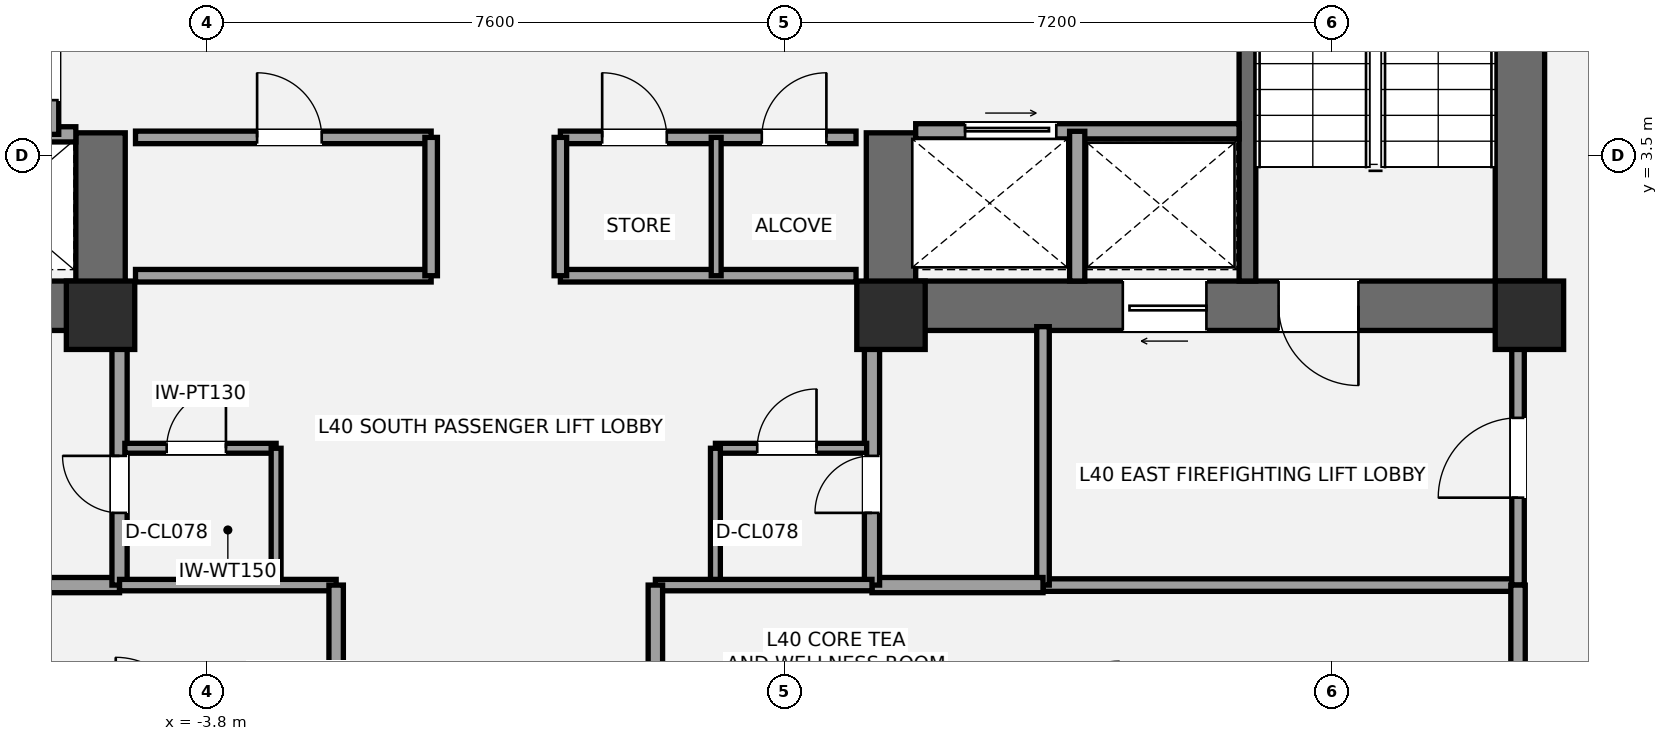
"""IFC4 building model, lengths in metres.
Left out: names, types, materials, properties, quantities, classifications, styles, units other than length and angle.
Written with IfcOpenShell. Run it as: python <this file> out.ifc"""

import sys

from ifc_helpers import new_model, si_unit, direction, frame, frame_2d, origin, origin_2d, place, context, subcontext, project, spatial, rectangle, extrude, element, fill, save


model = new_model("IFC4")
c1 = context("Model", 3, precision=1e-05, world=origin(), true_north=direction((0.0, 1.0)))
c2 = subcontext(c1, "Body", "Model", "MODEL_VIEW")
j1 = project(units=[si_unit("LENGTHUNIT", "METRE"), si_unit("PLANEANGLEUNIT", "RADIAN")], contexts=[c1])
p1 = place(None, origin())
s1 = spatial("IfcSite", under=j1, at=p1, CompositionType="ELEMENT")
p2 = place(p1, origin())
s2 = spatial("IfcBuilding", under=s1, at=p2, CompositionType="ELEMENT")
p3 = place(p2, frame((0.0, 0.0, 150.2)))
s3 = spatial("IfcBuildingStorey", under=s2, at=p3, CompositionType="ELEMENT", Elevation=150.2)
p4 = place(p3, frame((-4.875, 1.525, 0.0), z_axis=(0.0, 0.0, 1.0), x_axis=(-1.0, 0.0, 0.0)))
e1 = element("IfcWall", 1, at=p4, inside=s3, PredefinedType="SHEAR", context=c2, shape_type="SweptSolid", body=[
    extrude(rectangle(XDim=8.925, YDim=0.65, at=frame_2d((4.462, 0.0))), origin(), (0.0, 0.0, 1.0), 3.2),
])
p5 = place(p4, frame((5.425, 0.0, 0.0)))
e2 = element("IfcOpeningElement", 2, at=p5, cuts=e1, PredefinedType="OPENING", context=c2, shape_type="SweptSolid", body=[
    extrude(rectangle(XDim=1.05, YDim=2.15, at=frame_2d((0.525, 1.075))), frame((0.0, 0.335, 0.0), z_axis=(0.0, -1.0, 0.0), x_axis=(1.0, 0.0, 0.0)), (0.0, 0.0, 1.0), 0.67),
])
p6 = place(p4, frame((3.755, 0.0, 0.0)))
e3 = element("IfcOpeningElement", 3, at=p6, cuts=e1, PredefinedType="OPENING", context=c2, shape_type="SweptSolid", body=[
    extrude(rectangle(XDim=1.1, YDim=2.2, at=frame_2d((0.55, 1.1))), frame((0.0, 0.335, 0.0), z_axis=(0.0, -1.0, 0.0), x_axis=(1.0, 0.0, 0.0)), (0.0, 0.0, 1.0), 0.67),
])
p7 = place(p3, frame((-5.2, 1.2, 0.0), z_axis=(0.0, 0.0, 1.0), x_axis=(0.0, 1.0, 0.0)))
e4 = element("IfcWall", 4, at=p7, inside=s3, PredefinedType="SHEAR", context=c2, shape_type="SweptSolid", body=[
    extrude(rectangle(XDim=2.6, YDim=0.65, at=frame_2d((1.3, 0.0))), origin(), (0.0, 0.0, 1.0), 3.2),
])
p8 = place(p3, frame((13.475, 1.2, 0.0), z_axis=(0.0, 0.0, 1.0), x_axis=(0.0, 1.0, 0.0)))
e5 = element("IfcWall", 5, at=p8, inside=s3, PredefinedType="SHEAR", context=c2, shape_type="SweptSolid", body=[
    extrude(rectangle(XDim=8.45, YDim=0.65, at=frame_2d((4.225, 0.0))), origin(), (0.0, 0.0, 1.0), 3.2),
])
p9 = place(p3, frame((13.8, 1.525, 0.0), z_axis=(0.0, 0.0, 1.0), x_axis=(-1.0, 0.0, 0.0)))
e6 = element("IfcWall", 6, at=p9, inside=s3, PredefinedType="SHEAR", context=c2, shape_type="SweptSolid", body=[
    extrude(rectangle(XDim=8.925, YDim=0.65, at=frame_2d((4.462, 0.0))), origin(), (0.0, 0.0, 1.0), 3.2),
])
p10 = place(p9, frame((2.45, 0.0, 0.0)))
e7 = element("IfcOpeningElement", 7, at=p10, cuts=e6, PredefinedType="OPENING", context=c2, shape_type="SweptSolid", body=[
    extrude(rectangle(XDim=1.05, YDim=2.15, at=frame_2d((0.525, 1.075))), frame((0.0, 0.335, 0.0), z_axis=(0.0, -1.0, 0.0), x_axis=(1.0, 0.0, 0.0)), (0.0, 0.0, 1.0), 0.67),
])
p11 = place(p9, frame((4.45, 0.0, 0.0)))
e8 = element("IfcOpeningElement", 8, at=p11, cuts=e6, PredefinedType="OPENING", context=c2, shape_type="SweptSolid", body=[
    extrude(rectangle(XDim=1.1, YDim=2.2, at=frame_2d((0.55, 1.1))), frame((0.0, 0.335, 0.0), z_axis=(0.0, -1.0, 0.0), x_axis=(1.0, 0.0, 0.0)), (0.0, 0.0, 1.0), 0.67),
])
p12 = place(p3, frame((5.2, 1.2, 0.0), z_axis=(0.0, 0.0, 1.0), x_axis=(0.0, 1.0, 0.0)))
e9 = element("IfcWall", 9, at=p12, inside=s3, PredefinedType="SHEAR", context=c2, shape_type="SweptSolid", body=[
    extrude(rectangle(XDim=2.6, YDim=0.65, at=frame_2d((1.3, 0.0))), origin(), (0.0, 0.0, 1.0), 3.2),
])
p13 = place(p3, frame((9.89, 1.85, 0.0), z_axis=(0.0, 0.0, 1.0), x_axis=(0.0, 1.0, 0.0)))
e10 = element("IfcWall", 10, at=p13, inside=s3, PredefinedType="SHEAR", context=c2, shape_type="SweptSolid", body=[
    extrude(rectangle(XDim=7.15, YDim=0.22, at=frame_2d((3.575, 0.0))), origin(), (0.0, 0.0, 1.0), 3.2),
])
for number, where, z_axis, x_axis in (
    (11, (-5.2, 1.4, 0.0), (0.0, 0.0, 1.0), (1.0, 0.0, 0.0)),
    (12, (5.2, 1.4, 0.0), (0.0, 0.0, 1.0), (1.0, 0.0, 0.0)),
    (13, (13.6, 1.4, 0.0), (0.0, 0.0, 1.0), (1.0, 0.0, 0.0)),
):
    element("IfcColumn", number, at=place(p3, frame(where, z_axis=z_axis, x_axis=x_axis)), inside=s3, PredefinedType="COLUMN", context=c2, shape_type="SweptSolid", body=[
        extrude(rectangle(XDim=0.9, YDim=0.9, at=origin_2d()), origin(), (0.0, 0.0, 1.0), 3.2),
    ])
p14 = place(p3, frame((-7.2, -2.15, 0.0), z_axis=(0.0, 0.0, 1.0), x_axis=(1.0, 0.0, 0.0)))
e14 = element("IfcWall", 14, at=p14, inside=s3, PredefinedType="SOLIDWALL", context=c2, shape_type="SweptSolid", body=[
    extrude(rectangle(XDim=2.25, YDim=0.2, at=frame_2d((1.125, 0.0))), origin(), (0.0, 0.0, 1.0), 3.02),
])
p15 = place(p3, frame((-4.95, -2.15, 0.0), z_axis=(0.0, 0.0, 1.0), x_axis=(0.0, 1.0, 0.0)))
e15 = element("IfcWall", 15, at=p15, inside=s3, PredefinedType="SOLIDWALL", context=c2, shape_type="SweptSolid", body=[
    extrude(rectangle(XDim=3.4, YDim=0.2, at=frame_2d((1.7, 0.0))), origin(), (0.0, 0.0, 1.0), 2.473),
])
p16 = place(p15, frame((0.95, 0.0, 0.0)))
e16 = element("IfcOpeningElement", 16, at=p16, cuts=e15, PredefinedType="OPENING", context=c2, shape_type="SweptSolid", body=[
    extrude(rectangle(XDim=0.75, YDim=2.1, at=frame_2d((0.375, 1.05))), frame((0.0, 0.11, 0.0), z_axis=(0.0, -1.0, 0.0), x_axis=(1.0, 0.0, 0.0)), (0.0, 0.0, 1.0), 0.22),
])
p17 = place(p3, frame((7.2, -2.15, 0.0), z_axis=(0.0, 0.0, 1.0), x_axis=(1.0, 0.0, 0.0)))
e17 = element("IfcWall", 17, at=p17, inside=s3, PredefinedType="PARTITIONING", context=c2, shape_type="SweptSolid", body=[
    extrude(rectangle(XDim=6.25, YDim=0.165, at=frame_2d((3.125, 0.0))), origin(), (0.0, 0.0, 1.0), 3.02),
])
p18 = place(p3, frame((7.2, -2.15, 0.0), z_axis=(0.0, 0.0, 1.0), x_axis=(0.0, 1.0, 0.0)))
e18 = element("IfcWall", 18, at=p18, inside=s3, PredefinedType="PARTITIONING", context=c2, shape_type="SweptSolid", body=[
    extrude(rectangle(XDim=3.4, YDim=0.165, at=frame_2d((1.7, 0.0))), origin(), (0.0, 0.0, 1.0), 3.02),
])
p19 = place(p3, frame((13.45, -2.15, 0.0), z_axis=(0.0, 0.0, 1.0), x_axis=(0.0, 1.0, 0.0)))
e19 = element("IfcWall", 19, at=p19, inside=s3, PredefinedType="PARTITIONING", context=c2, shape_type="SweptSolid", body=[
    extrude(rectangle(XDim=3.4, YDim=0.165, at=frame_2d((1.7, 0.0))), origin(), (0.0, 0.0, 1.0), 2.473),
])
p20 = place(p19, frame((1.15, 0.0, 0.0)))
e20 = element("IfcOpeningElement", 20, at=p20, cuts=e19, PredefinedType="OPENING", context=c2, shape_type="SweptSolid", body=[
    extrude(rectangle(XDim=1.05, YDim=2.15, at=frame_2d((0.525, 1.075))), frame((0.0, 0.093, 0.0), z_axis=(0.0, -1.0, 0.0), x_axis=(1.0, 0.0, 0.0)), (0.0, 0.0, 1.0), 0.185),
])
p21 = place(p3, frame((4.95, -2.15, 0.0), z_axis=(0.0, 0.0, 1.0), x_axis=(1.0, 0.0, 0.0)))
e21 = element("IfcWall", 21, at=p21, inside=s3, PredefinedType="SOLIDWALL", context=c2, shape_type="SweptSolid", body=[
    extrude(rectangle(XDim=2.25, YDim=0.2, at=frame_2d((1.125, 0.0))), origin(), (0.0, 0.0, 1.0), 3.02),
])
p22 = place(p3, frame((4.95, -2.15, 0.0), z_axis=(0.0, 0.0, 1.0), x_axis=(0.0, 1.0, 0.0)))
e22 = element("IfcWall", 22, at=p22, inside=s3, PredefinedType="SOLIDWALL", context=c2, shape_type="SweptSolid", body=[
    extrude(rectangle(XDim=3.4, YDim=0.2, at=frame_2d((1.7, 0.0))), origin(), (0.0, 0.0, 1.0), 2.473),
])
p23 = place(p22, frame((0.95, 0.0, 0.0)))
e23 = element("IfcOpeningElement", 23, at=p23, cuts=e22, PredefinedType="OPENING", context=c2, shape_type="SweptSolid", body=[
    extrude(rectangle(XDim=0.75, YDim=2.1, at=frame_2d((0.375, 1.05))), frame((0.0, 0.11, 0.0), z_axis=(0.0, -1.0, 0.0), x_axis=(1.0, 0.0, 0.0)), (0.0, 0.0, 1.0), 0.22),
])
p24 = place(p3, frame((-4.88, -0.35, 0.0), z_axis=(0.0, 0.0, 1.0), x_axis=(1.0, 0.0, 0.0)))
e24 = element("IfcWall", 24, at=p24, inside=s3, PredefinedType="PARTITIONING", context=c2, shape_type="SweptSolid", body=[
    extrude(rectangle(XDim=1.99, YDim=0.13, at=frame_2d((0.995, 0.0))), origin(), (0.0, 0.0, 1.0), 3.02),
])
p25 = place(p24, frame((0.55, 0.0, 0.0)))
e25 = element("IfcOpeningElement", 25, at=p25, cuts=e24, PredefinedType="OPENING", context=c2, shape_type="SweptSolid", body=[
    extrude(rectangle(XDim=0.78, YDim=2.1, at=frame_2d((0.39, 1.05))), frame((0.0, 0.075, 0.0), z_axis=(0.0, -1.0, 0.0), x_axis=(1.0, 0.0, 0.0)), (0.0, 0.0, 1.0), 0.15),
])
p26 = place(p3, frame((-2.89, -2.15, 0.0), z_axis=(0.0, 0.0, 1.0), x_axis=(0.0, 1.0, 0.0)))
e26 = element("IfcWall", 26, at=p26, inside=s3, PredefinedType="PARTITIONING", context=c2, shape_type="SweptSolid", body=[
    extrude(rectangle(XDim=1.8, YDim=0.13, at=frame_2d((0.9, 0.0))), origin(), (0.0, 0.0, 1.0), 3.02),
])
p27 = place(p3, frame((2.89, -0.35, 0.0), z_axis=(0.0, 0.0, 1.0), x_axis=(1.0, 0.0, 0.0)))
e27 = element("IfcWall", 27, at=p27, inside=s3, PredefinedType="PARTITIONING", context=c2, shape_type="SweptSolid", body=[
    extrude(rectangle(XDim=1.99, YDim=0.13, at=frame_2d((0.995, 0.0))), origin(), (0.0, 0.0, 1.0), 3.02),
])
p28 = place(p27, frame((0.55, 0.0, 0.0)))
e28 = element("IfcOpeningElement", 28, at=p28, cuts=e27, PredefinedType="OPENING", context=c2, shape_type="SweptSolid", body=[
    extrude(rectangle(XDim=0.78, YDim=2.1, at=frame_2d((0.39, 1.05))), frame((0.0, 0.075, 0.0), z_axis=(0.0, -1.0, 0.0), x_axis=(1.0, 0.0, 0.0)), (0.0, 0.0, 1.0), 0.15),
])
p29 = place(p3, frame((2.89, -2.15, 0.0), z_axis=(0.0, 0.0, 1.0), x_axis=(0.0, 1.0, 0.0)))
e29 = element("IfcWall", 29, at=p29, inside=s3, PredefinedType="PARTITIONING", context=c2, shape_type="SweptSolid", body=[
    extrude(rectangle(XDim=1.8, YDim=0.13, at=frame_2d((0.9, 0.0))), origin(), (0.0, 0.0, 1.0), 3.02),
])
p30 = place(p3, frame((-9.78, 3.78, 0.0), z_axis=(0.0, 0.0, 1.0), x_axis=(1.0, 0.0, 0.0)))
e30 = element("IfcWall", 30, at=p30, inside=s3, PredefinedType="SOLIDWALL", context=c2, shape_type="SweptSolid", body=[
    extrude(rectangle(XDim=4.255, YDim=0.2, at=frame_2d((2.127, 0.0))), origin(), (0.0, 0.0, 1.0), 3.02),
])
p31 = place(p3, frame((-5.85, 3.78, 0.0), z_axis=(0.0, 0.0, 1.0), x_axis=(0.0, 1.0, 0.0)))
e31 = element("IfcWall", 31, at=p31, inside=s3, PredefinedType="SOLIDWALL", context=c2, shape_type="SweptSolid", body=[
    extrude(rectangle(XDim=1.69, YDim=0.2, at=frame_2d((0.845, 0.0))), origin(), (0.0, 0.0, 1.0), 3.02),
])
p32 = place(p31, frame((0.45, 0.0, 0.0)))
e32 = element("IfcOpeningElement", 32, at=p32, cuts=e31, PredefinedType="OPENING", context=c2, shape_type="SweptSolid", body=[
    extrude(rectangle(XDim=0.75, YDim=2.1, at=frame_2d((0.375, 1.05))), frame((0.0, 0.11, 0.0), z_axis=(0.0, -1.0, 0.0), x_axis=(1.0, 0.0, 0.0)), (0.0, 0.0, 1.0), 0.22),
])
p33 = place(p3, frame((5.525, 3.82, 0.0), z_axis=(0.0, 0.0, 1.0), x_axis=(1.0, 0.0, 0.0)))
e33 = element("IfcWall", 33, at=p33, inside=s3, PredefinedType="SOLIDWALL", context=c2, shape_type="SweptSolid", body=[
    extrude(rectangle(XDim=4.255, YDim=0.2, at=frame_2d((2.127, 0.0))), origin(), (0.0, 0.0, 1.0), 3.02),
])
p34 = place(p33, frame((0.65, 0.0, 0.0)))
e34 = element("IfcOpeningElement", 34, at=p34, cuts=e33, PredefinedType="OPENING", context=c2, shape_type="SweptSolid", body=[
    extrude(rectangle(XDim=1.2, YDim=2.2, at=frame_2d((0.6, 1.1))), frame((0.0, 0.11, 0.0), z_axis=(0.0, -1.0, 0.0), x_axis=(1.0, 0.0, 0.0)), (0.0, 0.0, 1.0), 0.22),
])
p35 = place(p3, frame((7.65, 1.85, 0.0), z_axis=(0.0, 0.0, 1.0), x_axis=(0.0, 1.0, 0.0)))
e35 = element("IfcWall", 35, at=p35, inside=s3, PredefinedType="SOLIDWALL", context=c2, shape_type="SweptSolid", body=[
    extrude(rectangle(XDim=1.97, YDim=0.2, at=frame_2d((0.985, 0.0))), origin(), (0.0, 0.0, 1.0), 3.02),
])
p36 = place(p3, frame((-4.74, 1.92, 0.0), z_axis=(0.0, 0.0, 1.0), x_axis=(1.0, 0.0, 0.0)))
e36 = element("IfcWall", 36, at=p36, inside=s3, PredefinedType="PARTITIONING", context=c2, shape_type="SweptSolid", body=[
    extrude(rectangle(XDim=3.89, YDim=0.165, at=frame_2d((1.945, 0.0))), origin(), (0.0, 0.0, 1.0), 2.16),
])
p37 = place(p3, frame((-4.74, 3.74, 0.0), z_axis=(0.0, 0.0, 1.0), x_axis=(1.0, 0.0, 0.0)))
e37 = element("IfcWall", 37, at=p37, inside=s3, PredefinedType="PARTITIONING", context=c2, shape_type="SweptSolid", body=[
    extrude(rectangle(XDim=3.89, YDim=0.165, at=frame_2d((1.945, 0.0))), origin(), (0.0, 0.0, 1.0), 3.02),
])
p38 = place(p37, frame((1.6, 0.0, 0.0)))
e38 = element("IfcOpeningElement", 38, at=p38, cuts=e37, PredefinedType="OPENING", context=c2, shape_type="SweptSolid", body=[
    extrude(rectangle(XDim=0.85, YDim=2.1, at=frame_2d((0.425, 1.05))), frame((0.0, 0.093, 0.0), z_axis=(0.0, -1.0, 0.0), x_axis=(1.0, 0.0, 0.0)), (0.0, 0.0, 1.0), 0.185),
])
p39 = place(p3, frame((-0.85, 1.92, 0.0), z_axis=(0.0, 0.0, 1.0), x_axis=(0.0, 1.0, 0.0)))
e39 = element("IfcWall", 39, at=p39, inside=s3, PredefinedType="PARTITIONING", context=c2, shape_type="SweptSolid", body=[
    extrude(rectangle(XDim=1.82, YDim=0.165, at=frame_2d((0.91, 0.0))), origin(), (0.0, 0.0, 1.0), 3.02),
])
p40 = place(p3, frame((0.85, 1.92, 0.0), z_axis=(0.0, 0.0, 1.0), x_axis=(1.0, 0.0, 0.0)))
e40 = element("IfcWall", 40, at=p40, inside=s3, PredefinedType="PARTITIONING", context=c2, shape_type="SweptSolid", body=[
    extrude(rectangle(XDim=3.89, YDim=0.165, at=frame_2d((1.945, 0.0))), origin(), (0.0, 0.0, 1.0), 2.16),
])
p41 = place(p3, frame((0.85, 3.74, 0.0), z_axis=(0.0, 0.0, 1.0), x_axis=(1.0, 0.0, 0.0)))
e41 = element("IfcWall", 41, at=p41, inside=s3, PredefinedType="PARTITIONING", context=c2, shape_type="SweptSolid", body=[
    extrude(rectangle(XDim=3.89, YDim=0.165, at=frame_2d((1.945, 0.0))), origin(), (0.0, 0.0, 1.0), 3.02),
])
p42 = place(p41, frame((0.55, 0.0, 0.0)))
e42 = element("IfcOpeningElement", 42, at=p42, cuts=e41, PredefinedType="OPENING", context=c2, shape_type="SweptSolid", body=[
    extrude(rectangle(XDim=0.85, YDim=2.1, at=frame_2d((0.425, 1.05))), frame((0.0, 0.093, 0.0), z_axis=(0.0, -1.0, 0.0), x_axis=(1.0, 0.0, 0.0)), (0.0, 0.0, 1.0), 0.185),
])
p43 = place(p41, frame((2.65, 0.0, 0.0)))
e43 = element("IfcOpeningElement", 43, at=p43, cuts=e41, PredefinedType="OPENING", context=c2, shape_type="SweptSolid", body=[
    extrude(rectangle(XDim=0.85, YDim=2.1, at=frame_2d((0.425, 1.05))), frame((0.0, 0.093, 0.0), z_axis=(0.0, -1.0, 0.0), x_axis=(1.0, 0.0, 0.0)), (0.0, 0.0, 1.0), 0.185),
])
p44 = place(p3, frame((0.85, 1.92, 0.0), z_axis=(0.0, 0.0, 1.0), x_axis=(0.0, 1.0, 0.0)))
e44 = element("IfcWall", 44, at=p44, inside=s3, PredefinedType="PARTITIONING", context=c2, shape_type="SweptSolid", body=[
    extrude(rectangle(XDim=1.82, YDim=0.165, at=frame_2d((0.91, 0.0))), origin(), (0.0, 0.0, 1.0), 3.02),
])
p45 = place(p3, frame((2.9, 1.92, 0.0), z_axis=(0.0, 0.0, 1.0), x_axis=(0.0, 1.0, 0.0)))
e45 = element("IfcWall", 45, at=p45, inside=s3, PredefinedType="PARTITIONING", context=c2, shape_type="SweptSolid", body=[
    extrude(rectangle(XDim=1.82, YDim=0.13, at=frame_2d((0.91, 0.0))), origin(), (0.0, 0.0, 1.0), 3.02),
])
p46 = place(p3, frame((-4.95, -2.15, 0.0), z_axis=(0.0, 0.0, 1.0), x_axis=(1.0, 0.0, 0.0)))
e46 = element("IfcWall", 46, at=p46, inside=s3, PredefinedType="PLUMBINGWALL", context=c2, shape_type="SweptSolid", body=[
    extrude(rectangle(XDim=2.85, YDim=0.15, at=frame_2d((1.425, 0.0))), origin(), (0.0, 0.0, 1.0), 2.473),
])
p47 = place(p3, frame((-2.1, -4.05, 0.0), z_axis=(0.0, 0.0, 1.0), x_axis=(0.0, 1.0, 0.0)))
e47 = element("IfcWall", 47, at=p47, inside=s3, PredefinedType="PLUMBINGWALL", context=c2, shape_type="SweptSolid", body=[
    extrude(rectangle(XDim=1.9, YDim=0.19, at=frame_2d((0.95, 0.0))), origin(), (0.0, 0.0, 1.0), 3.02),
])
p48 = place(p3, frame((2.1, -2.15, 0.0), z_axis=(0.0, 0.0, 1.0), x_axis=(1.0, 0.0, 0.0)))
e48 = element("IfcWall", 48, at=p48, inside=s3, PredefinedType="PLUMBINGWALL", context=c2, shape_type="SweptSolid", body=[
    extrude(rectangle(XDim=2.85, YDim=0.15, at=frame_2d((1.425, 0.0))), origin(), (0.0, 0.0, 1.0), 3.02),
])
p49 = place(p3, frame((2.1, -4.05, 0.0), z_axis=(0.0, 0.0, 1.0), x_axis=(0.0, 1.0, 0.0)))
e49 = element("IfcWall", 49, at=p49, inside=s3, PredefinedType="PLUMBINGWALL", context=c2, shape_type="SweptSolid", body=[
    extrude(rectangle(XDim=1.9, YDim=0.19, at=frame_2d((0.95, 0.0))), origin(), (0.0, 0.0, 1.0), 3.02),
])
p50 = place(p3, frame((13.45, -4.05, 0.0), z_axis=(0.0, 0.0, 1.0), x_axis=(0.0, 1.0, 0.0)))
e50 = element("IfcWall", 50, at=p50, inside=s3, PredefinedType="PLUMBINGWALL", context=c2, shape_type="SweptSolid", body=[
    extrude(rectangle(XDim=1.9, YDim=0.19, at=frame_2d((0.95, 0.0))), origin(), (0.0, 0.0, 1.0), 2.473),
])
p51 = place(p10, origin())
e51 = element("IfcDoor", 51, at=p51, inside=s3, OperationType="SINGLE_SWING_LEFT", PredefinedType="DOOR", context=c2, shape_type="SweptSolid", body=[
    extrude(rectangle(XDim=1.05, YDim=2.15, at=frame_2d((0.525, 1.075))), frame((0.0, 0.025, 0.0), z_axis=(0.0, -1.0, 0.0), x_axis=(1.0, 0.0, 0.0)), (0.0, 0.0, 1.0), 0.05),
])
fill(e7, e51)
p52 = place(p16, origin())
e52 = element("IfcDoor", 52, at=p52, inside=s3, OperationType="SINGLE_SWING_RIGHT", PredefinedType="DOOR", context=c2, shape_type="SweptSolid", body=[
    extrude(rectangle(XDim=0.75, YDim=2.1, at=frame_2d((0.375, 1.05))), frame((0.0, 0.025, 0.0), z_axis=(0.0, -1.0, 0.0), x_axis=(1.0, 0.0, 0.0)), (0.0, 0.0, 1.0), 0.05),
])
fill(e16, e52)
p53 = place(p20, origin())
e53 = element("IfcDoor", 53, at=p53, inside=s3, OperationType="SINGLE_SWING_LEFT", PredefinedType="DOOR", context=c2, shape_type="SweptSolid", body=[
    extrude(rectangle(XDim=1.05, YDim=2.15, at=frame_2d((0.525, 1.075))), frame((0.0, 0.025, 0.0), z_axis=(0.0, -1.0, 0.0), x_axis=(1.0, 0.0, 0.0)), (0.0, 0.0, 1.0), 0.05),
])
fill(e20, e53)
p54 = place(p23, origin())
e54 = element("IfcDoor", 54, at=p54, inside=s3, OperationType="SINGLE_SWING_LEFT", PredefinedType="DOOR", context=c2, shape_type="SweptSolid", body=[
    extrude(rectangle(XDim=0.75, YDim=2.1, at=frame_2d((0.375, 1.05))), frame((0.0, 0.025, 0.0), z_axis=(0.0, -1.0, 0.0), x_axis=(1.0, 0.0, 0.0)), (0.0, 0.0, 1.0), 0.05),
])
fill(e23, e54)
p55 = place(p25, origin())
e55 = element("IfcDoor", 55, at=p55, inside=s3, OperationType="SINGLE_SWING_RIGHT", PredefinedType="DOOR", context=c2, shape_type="SweptSolid", body=[
    extrude(rectangle(XDim=0.78, YDim=2.1, at=frame_2d((0.39, 1.05))), frame((0.0, 0.025, 0.0), z_axis=(0.0, -1.0, 0.0), x_axis=(1.0, 0.0, 0.0)), (0.0, 0.0, 1.0), 0.05),
])
fill(e25, e55)
p56 = place(p28, origin())
e56 = element("IfcDoor", 56, at=p56, inside=s3, OperationType="SINGLE_SWING_RIGHT", PredefinedType="DOOR", context=c2, shape_type="SweptSolid", body=[
    extrude(rectangle(XDim=0.78, YDim=2.1, at=frame_2d((0.39, 1.05))), frame((0.0, 0.025, 0.0), z_axis=(0.0, -1.0, 0.0), x_axis=(1.0, 0.0, 0.0)), (0.0, 0.0, 1.0), 0.05),
])
fill(e28, e56)
p57 = place(p32, origin())
e57 = element("IfcDoor", 57, at=p57, inside=s3, OperationType="SINGLE_SWING_RIGHT", PredefinedType="DOOR", context=c2, shape_type="SweptSolid", body=[
    extrude(rectangle(XDim=0.75, YDim=2.1, at=frame_2d((0.375, 1.05))), frame((0.0, 0.025, 0.0), z_axis=(0.0, -1.0, 0.0), x_axis=(1.0, 0.0, 0.0)), (0.0, 0.0, 1.0), 0.05),
])
fill(e32, e57)
p58 = place(p11, origin())
e58 = element("IfcDoor", 58, at=p58, inside=s3, OperationType="SLIDING_TO_LEFT", PredefinedType="DOOR", context=c2, shape_type="SweptSolid", body=[
    extrude(rectangle(XDim=1.1, YDim=2.2, at=frame_2d((0.55, 1.1))), frame((0.0, 0.025, 0.0), z_axis=(0.0, -1.0, 0.0), x_axis=(1.0, 0.0, 0.0)), (0.0, 0.0, 1.0), 0.05),
])
fill(e8, e58)
p59 = place(p34, origin())
e59 = element("IfcDoor", 59, at=p59, inside=s3, OperationType="SLIDING_TO_RIGHT", PredefinedType="DOOR", context=c2, shape_type="SweptSolid", body=[
    extrude(rectangle(XDim=1.2, YDim=2.2, at=frame_2d((0.6, 1.1))), frame((0.0, 0.025, 0.0), z_axis=(0.0, -1.0, 0.0), x_axis=(1.0, 0.0, 0.0)), (0.0, 0.0, 1.0), 0.05),
])
fill(e34, e59)
p60 = place(p38, origin())
e60 = element("IfcDoor", 60, at=p60, inside=s3, OperationType="SINGLE_SWING_LEFT", PredefinedType="DOOR", context=c2, shape_type="SweptSolid", body=[
    extrude(rectangle(XDim=0.85, YDim=2.1, at=frame_2d((0.425, 1.05))), frame((0.0, 0.025, 0.0), z_axis=(0.0, -1.0, 0.0), x_axis=(1.0, 0.0, 0.0)), (0.0, 0.0, 1.0), 0.05),
])
fill(e38, e60)
p61 = place(p42, origin())
e61 = element("IfcDoor", 61, at=p61, inside=s3, OperationType="SINGLE_SWING_LEFT", PredefinedType="DOOR", context=c2, shape_type="SweptSolid", body=[
    extrude(rectangle(XDim=0.85, YDim=2.1, at=frame_2d((0.425, 1.05))), frame((0.0, 0.025, 0.0), z_axis=(0.0, -1.0, 0.0), x_axis=(1.0, 0.0, 0.0)), (0.0, 0.0, 1.0), 0.05),
])
fill(e42, e61)
p62 = place(p43, origin())
e62 = element("IfcDoor", 62, at=p62, inside=s3, OperationType="SINGLE_SWING_RIGHT", PredefinedType="DOOR", context=c2, shape_type="SweptSolid", body=[
    extrude(rectangle(XDim=0.85, YDim=2.1, at=frame_2d((0.425, 1.05))), frame((0.0, 0.025, 0.0), z_axis=(0.0, -1.0, 0.0), x_axis=(1.0, 0.0, 0.0)), (0.0, 0.0, 1.0), 0.05),
])
fill(e43, e62)
save(model, sys.argv[1])
